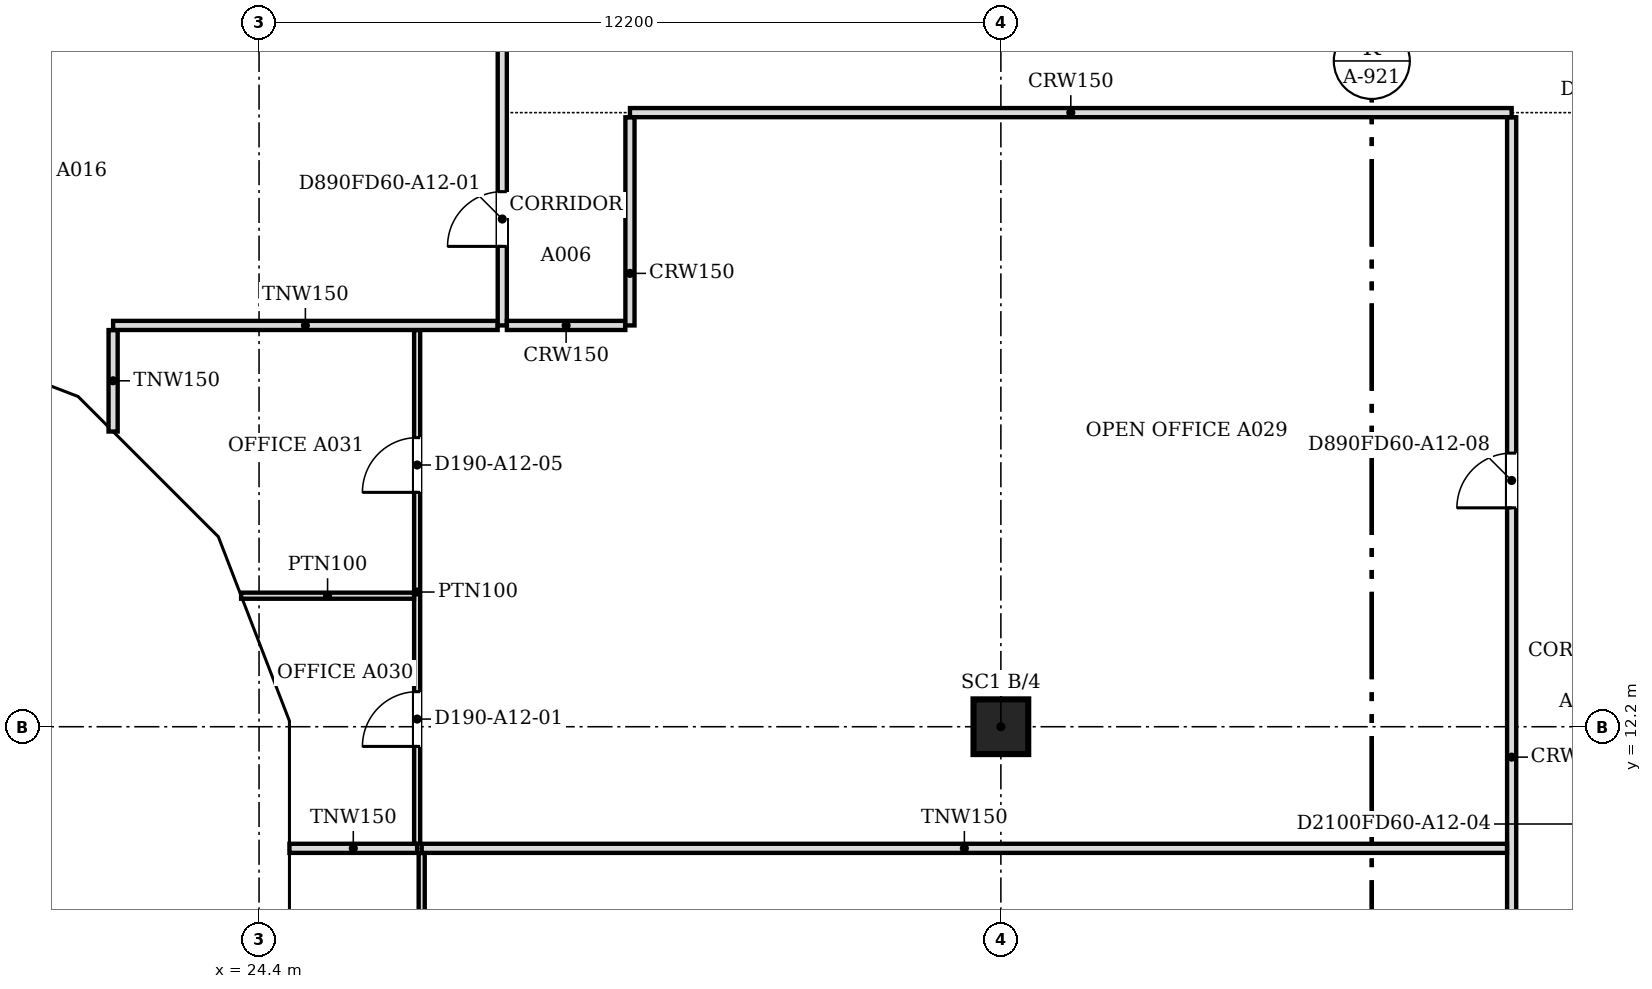
"""IFC4 building model, lengths in metres.
Left out: names, types, materials, properties, quantities, classifications, styles, units other than length and angle.
Written with IfcOpenShell. Run it as: python <this file> out.ifc"""

import sys

from ifc_helpers import new_model, si_unit, direction, frame, frame_2d, origin, origin_2d, place, context, subcontext, project, spatial, polyline, rectangle, outline, extrude, faceted_brep, source, transform, mapped, element, fill, save


model = new_model("IFC4")
c1 = context("Model", 3, precision=1e-05, world=origin(), true_north=direction((0.0, 1.0)))
c2 = subcontext(c1, "Body", "Model", "MODEL_VIEW")
j1 = project(units=[si_unit("LENGTHUNIT", "METRE"), si_unit("PLANEANGLEUNIT", "RADIAN")], contexts=[c1])
p1 = place(None, origin())
s1 = spatial("IfcSite", under=j1, at=p1, CompositionType="ELEMENT")
p2 = place(p1, origin())
s2 = spatial("IfcBuilding", under=s1, at=p2, CompositionType="ELEMENT")
p3 = place(p2, frame((0.0, 0.0, 139.2)))
s3 = spatial("IfcBuildingStorey", under=s2, at=p3, CompositionType="ELEMENT", Elevation=139.2)
p4 = place(p3, frame((36.6, 12.2, 0.0), z_axis=(0.0, 0.0, 1.0), x_axis=(1.0, 0.0, 0.0)))
e1 = element("IfcColumn", 1, at=p4, inside=s3, PredefinedType="COLUMN", context=c2, shape_type="SweptSolid", body=[
    extrude(rectangle(XDim=0.9, YDim=0.9, at=origin_2d()), origin(), (0.0, 0.0, 1.0), 3.6),
])
m1 = source(origin(), c2, "Body", "Brep", [
    faceted_brep([(3.096, -0.25, 7.536), (0.047, -0.25, 3.856), (0.047, -0.25, 3.744), (3.096, -0.25, 0.064), (0.0, 0.25, 3.8), (3.149, 0.25, 7.6), (3.202, 0.25, 7.536), (3.202, 0.25, 0.064), (3.149, 0.25, 0.0), (3.149, -0.0, 0.0), (3.149, -0.0, 7.6), (0.0, 0.0, 3.8)], [[[0, 1, 2, 3]], [[4, 5, 6, 7, 8]], [[8, 7, 9]], [[6, 5, 10]], [[5, 4, 11, 1, 0, 10]], [[4, 8, 9, 3, 2, 11]], [[11, 2, 1]], [[3, 9, 7, 6, 10, 0]]]),
])
p5 = place(p3, frame((18.346, 18.55, -3.8), z_axis=(0.0, 0.0, 1.0), x_axis=(0.932985567668, -0.359913782069, 0.0)))
e2 = element("IfcWall", 2, at=p5, inside=s3, PredefinedType="SOLIDWALL", context=c2, shape_type="MappedRepresentation", body=[
    mapped(m1, transform((0.0, 0.0, 0.0), scale=1.0)),
])
m2 = source(origin(), c2, "Body", "SweptSolid", [
    extrude(outline(polyline([(2.949, 6.967), (0.325, 3.8), (2.949, 0.633), (2.949, 6.967)])), frame((0.0, 0.26, 0.0), z_axis=(0.0, -1.0, 0.0), x_axis=(1.0, 0.0, 0.0)), (0.0, 0.0, 1.0), 0.52),
])
p6 = place(p5, origin())
e3 = element("IfcOpeningElement", 3, at=p6, cuts=e2, PredefinedType="OPENING", context=c2, shape_type="MappedRepresentation", body=[
    mapped(m2, transform((0.0, 0.0, 0.0), scale=1.0)),
])
m3 = source(origin(), c2, "Body", "Brep", [
    faceted_brep([(0.106, -0.25, 0.064), (3.156, -0.25, 3.736), (3.156, -0.25, 3.864), (0.106, -0.25, 7.536), (0.0, 0.25, 7.536), (0.053, 0.25, 7.6), (3.209, 0.25, 3.8), (0.053, 0.25, 0.0), (0.0, 0.25, 0.064), (3.209, -0.0, 3.8), (0.053, 0.0, 0.0), (0.053, 0.0, 7.6)], [[[0, 1, 2, 3]], [[4, 5, 6, 7, 8]], [[7, 6, 9, 1, 0, 10]], [[6, 5, 11, 3, 2, 9]], [[5, 4, 11]], [[8, 7, 10]], [[8, 10, 0, 3, 11, 4]], [[1, 9, 2]]]),
])
p7 = place(p3, frame((21.248, 17.454, -3.8), z_axis=(0.0, 0.0, 1.0), x_axis=(0.707106781187, -0.707106781187, 0.0)))
e4 = element("IfcWall", 4, at=p7, inside=s3, PredefinedType="SOLIDWALL", context=c2, shape_type="MappedRepresentation", body=[
    mapped(m3, transform((0.0, 0.0, 0.0), scale=1.0)),
])
m4 = source(origin(), c2, "Body", "SweptSolid", [
    extrude(outline(polyline([(0.253, 0.632), (2.884, 3.8), (0.253, 6.968), (0.253, 0.632)])), frame((0.0, 0.26, 0.0), z_axis=(0.0, -1.0, 0.0), x_axis=(1.0, 0.0, 0.0)), (0.0, 0.0, 1.0), 0.52),
])
p8 = place(p7, origin())
e5 = element("IfcOpeningElement", 5, at=p8, cuts=e4, PredefinedType="OPENING", context=c2, shape_type="MappedRepresentation", body=[
    mapped(m4, transform((0.0, 0.0, 0.0), scale=1.0)),
])
m5 = source(origin(), c2, "Body", "Brep", [
    faceted_brep([(3.103, -0.25, 7.544), (0.053, -0.25, 3.864), (0.053, -0.25, 3.736), (3.103, -0.25, 0.056), (0.0, 0.25, 3.8), (3.149, 0.25, 7.6), (3.196, 0.25, 7.543), (3.196, 0.25, 0.057), (3.149, 0.25, 0.0), (3.149, -0.0, 0.0), (3.149, -0.0, 7.6), (0.0, 0.0, 3.8)], [[[0, 1, 2, 3]], [[4, 5, 6, 7, 8]], [[8, 7, 9]], [[6, 5, 10]], [[5, 4, 11, 1, 0, 10]], [[4, 8, 9, 3, 2, 11]], [[11, 2, 1]], [[3, 9, 7, 6, 10, 0]]]),
])
p9 = place(p3, frame((23.517, 15.185, -3.8), z_axis=(0.0, 0.0, 1.0), x_axis=(0.359864468756, -0.933004589553, 0.0)))
e6 = element("IfcWall", 6, at=p9, inside=s3, PredefinedType="SOLIDWALL", context=c2, shape_type="MappedRepresentation", body=[
    mapped(m5, transform((0.0, 0.0, 0.0), scale=1.0)),
])
p10 = place(p9, origin())
e7 = element("IfcOpeningElement", 7, at=p10, cuts=e6, PredefinedType="OPENING", context=c2, shape_type="MappedRepresentation", body=[
    mapped(m2, transform((0.0, 0.0, 0.0), scale=1.0)),
])
m6 = source(origin(), c2, "Body", "Brep", [
    faceted_brep([(0.093, -0.25, 0.057), (3.143, -0.25, 3.8), (0.093, -0.25, 7.543), (0.0, 0.25, 7.544), (0.047, 0.25, 7.6), (3.143, 0.25, 3.8), (0.047, 0.25, 0.0), (0.0, 0.25, 0.056), (0.047, 0.0, 0.0), (0.047, 0.0, 7.6)], [[[0, 1, 2]], [[3, 4, 5, 6, 7]], [[6, 5, 1, 0, 8]], [[5, 4, 9, 2, 1]], [[4, 3, 9]], [[7, 6, 8]], [[7, 8, 0, 2, 9, 3]]]),
])
p11 = place(p3, frame((24.65, 12.293, -3.8), z_axis=(0.0, 0.0, 1.0), x_axis=(0.0, -1.0, 0.0)))
e8 = element("IfcWall", 8, at=p11, inside=s3, PredefinedType="SOLIDWALL", context=c2, shape_type="MappedRepresentation", body=[
    mapped(m6, transform((0.0, 0.0, 0.0), scale=1.0)),
])
m7 = source(origin(), c2, "Body", "SweptSolid", [
    extrude(outline(polyline([(0.247, 0.641), (2.821, 3.8), (0.247, 6.959), (0.247, 0.641)])), frame((0.0, 0.26, 0.0), z_axis=(0.0, -1.0, 0.0), x_axis=(1.0, 0.0, 0.0)), (0.0, 0.0, 1.0), 0.52),
])
p12 = place(p11, origin())
e9 = element("IfcOpeningElement", 9, at=p12, cuts=e8, PredefinedType="OPENING", context=c2, shape_type="MappedRepresentation", body=[
    mapped(m7, transform((0.0, 0.0, 0.0), scale=1.0)),
])
p13 = place(p2, frame((0.0, 0.0, 143.0)))
s4 = spatial("IfcBuildingStorey", under=s2, at=p13, CompositionType="ELEMENT", Elevation=143.0)
m8 = source(origin(), c2, "Body", "Brep", [
    faceted_brep([(0.093, -0.25, 0.056), (3.143, -0.25, 3.736), (3.143, -0.25, 3.864), (0.093, -0.25, 7.544), (0.0, 0.25, 7.543), (0.047, 0.25, 7.6), (3.196, 0.25, 3.8), (0.047, 0.25, 0.0), (0.0, 0.25, 0.057), (3.196, -0.0, 3.8), (0.047, 0.0, 0.0), (0.047, 0.0, 7.6)], [[[0, 1, 2, 3]], [[4, 5, 6, 7, 8]], [[7, 6, 9, 1, 0, 10]], [[6, 5, 11, 3, 2, 9]], [[5, 4, 11]], [[8, 7, 10]], [[8, 10, 0, 3, 11, 4]], [[1, 9, 2]]]),
])
p14 = place(p13, frame((18.303, 18.567, -3.8), z_axis=(0.0, 0.0, 1.0), x_axis=(0.932978940178, -0.359930961693, 0.0)))
e10 = element("IfcWall", 10, at=p14, inside=s4, PredefinedType="SOLIDWALL", context=c2, shape_type="MappedRepresentation", body=[
    mapped(m8, transform((0.0, 0.0, 0.0), scale=1.0)),
])
m9 = source(origin(), c2, "Body", "SweptSolid", [
    extrude(outline(polyline([(0.247, 0.633), (2.871, 3.8), (0.247, 6.967), (0.247, 0.633)])), frame((0.0, 0.26, 0.0), z_axis=(0.0, -1.0, 0.0), x_axis=(1.0, 0.0, 0.0)), (0.0, 0.0, 1.0), 0.52),
])
p15 = place(p14, origin())
e11 = element("IfcOpeningElement", 11, at=p15, cuts=e10, PredefinedType="OPENING", context=c2, shape_type="MappedRepresentation", body=[
    mapped(m9, transform((0.0, 0.0, 0.0), scale=1.0)),
])
m10 = source(origin(), c2, "Body", "Brep", [
    faceted_brep([(3.103, -0.25, 7.536), (0.053, -0.25, 3.864), (0.053, -0.25, 3.736), (3.103, -0.25, 0.064), (0.0, 0.25, 3.8), (3.156, 0.25, 7.6), (3.209, 0.25, 7.536), (3.209, 0.25, 0.064), (3.156, 0.25, 0.0), (3.156, -0.0, 0.0), (3.156, -0.0, 7.6), (0.0, 0.0, 3.8)], [[[0, 1, 2, 3]], [[4, 5, 6, 7, 8]], [[8, 7, 9]], [[6, 5, 10]], [[5, 4, 11, 1, 0, 10]], [[4, 8, 9, 3, 2, 11]], [[11, 2, 1]], [[3, 9, 7, 6, 10, 0]]]),
])
p16 = place(p13, frame((21.285, 17.417, -3.8), z_axis=(0.0, 0.0, 1.0), x_axis=(0.707106781187, -0.707106781187, 0.0)))
e12 = element("IfcWall", 12, at=p16, inside=s4, PredefinedType="SOLIDWALL", context=c2, shape_type="MappedRepresentation", body=[
    mapped(m10, transform((0.0, 0.0, 0.0), scale=1.0)),
])
m11 = source(origin(), c2, "Body", "SweptSolid", [
    extrude(outline(polyline([(2.956, 6.968), (0.325, 3.8), (2.956, 0.632), (2.956, 6.968)])), frame((0.0, 0.26, 0.0), z_axis=(0.0, -1.0, 0.0), x_axis=(1.0, 0.0, 0.0)), (0.0, 0.0, 1.0), 0.52),
])
p17 = place(p16, origin())
e13 = element("IfcOpeningElement", 13, at=p17, cuts=e12, PredefinedType="OPENING", context=c2, shape_type="MappedRepresentation", body=[
    mapped(m11, transform((0.0, 0.0, 0.0), scale=1.0)),
])
m12 = source(origin(), c2, "Body", "Brep", [
    faceted_brep([(0.106, -0.25, 0.064), (3.156, -0.25, 3.744), (3.156, -0.25, 3.856), (0.106, -0.25, 7.536), (0.0, 0.25, 7.536), (0.053, 0.25, 7.6), (3.202, 0.25, 3.8), (0.053, 0.25, 0.0), (0.0, 0.25, 0.064), (3.202, -0.0, 3.8), (0.053, 0.0, 0.0), (0.053, 0.0, 7.6)], [[[0, 1, 2, 3]], [[4, 5, 6, 7, 8]], [[7, 6, 9, 1, 0, 10]], [[6, 5, 11, 3, 2, 9]], [[5, 4, 11]], [[8, 7, 10]], [[8, 10, 0, 3, 11, 4]], [[1, 9, 2]]]),
])
p18 = place(p13, frame((23.497, 15.234, -3.8), z_axis=(0.0, 0.0, 1.0), x_axis=(0.359913782069, -0.932985567668, 0.0)))
e14 = element("IfcWall", 14, at=p18, inside=s4, PredefinedType="SOLIDWALL", context=c2, shape_type="MappedRepresentation", body=[
    mapped(m12, transform((0.0, 0.0, 0.0), scale=1.0)),
])
m13 = source(origin(), c2, "Body", "SweptSolid", [
    extrude(outline(polyline([(0.253, 0.633), (2.878, 3.8), (0.253, 6.967), (0.253, 0.633)])), frame((0.0, 0.26, 0.0), z_axis=(0.0, -1.0, 0.0), x_axis=(1.0, 0.0, 0.0)), (0.0, 0.0, 1.0), 0.52),
])
p19 = place(p18, origin())
e15 = element("IfcOpeningElement", 15, at=p19, cuts=e14, PredefinedType="OPENING", context=c2, shape_type="MappedRepresentation", body=[
    mapped(m13, transform((0.0, 0.0, 0.0), scale=1.0)),
])
m14 = source(origin(), c2, "Body", "Brep", [
    faceted_brep([(3.096, -0.25, 0.0), (6.1, -0.25, 3.8), (3.096, -0.25, 7.6), (0.047, -0.25, 3.857), (0.047, -0.25, 3.743), (0.0, 0.25, 3.8), (3.096, 0.25, 7.6), (6.053, 0.25, 3.859), (6.053, 0.25, 3.741), (3.096, 0.25, 0.0), (6.1, -0.0, 3.8), (0.0, 0.0, 3.8)], [[[0, 1, 2, 3, 4]], [[5, 6, 7, 8, 9]], [[9, 8, 10, 1, 0]], [[7, 6, 2, 1, 10]], [[6, 5, 11, 3, 2]], [[5, 9, 0, 4, 11]], [[11, 4, 3]], [[10, 8, 7]]]),
])
p20 = place(p13, frame((24.65, 12.247, -3.8), z_axis=(0.0, 0.0, 1.0), x_axis=(0.0, -1.0, 0.0)))
e16 = element("IfcWall", 16, at=p20, inside=s4, PredefinedType="SOLIDWALL", context=c2, shape_type="MappedRepresentation", body=[
    mapped(m14, transform((0.0, 0.0, 0.0), scale=1.0)),
])
m15 = source(origin(), c2, "Body", "SweptSolid", [
    extrude(outline(polyline([(3.094, 0.399), (5.781, 3.8), (3.094, 7.201), (0.323, 3.8), (3.094, 0.399)])), frame((0.0, 0.26, 0.0), z_axis=(0.0, -1.0, 0.0), x_axis=(1.0, 0.0, 0.0)), (0.0, 0.0, 1.0), 0.52),
])
p21 = place(p20, origin())
e17 = element("IfcOpeningElement", 17, at=p21, cuts=e16, PredefinedType="OPENING", context=c2, shape_type="MappedRepresentation", body=[
    mapped(m15, transform((0.0, 0.0, 0.0), scale=1.0)),
])
p22 = place(p3, frame((45.0, 0.5, 0.0), z_axis=(0.0, 0.0, 1.0), x_axis=(0.0, 1.0, 0.0)))
e18 = element("IfcWall", 18, at=p22, inside=s3, PredefinedType="PARTITIONING", context=c2, shape_type="SweptSolid", body=[
    extrude(rectangle(XDim=21.724, YDim=0.15, at=frame_2d((10.862, 0.0))), origin(), (0.0, 0.0, 1.0), 3.067),
])
m16 = source(origin(), c2, "Body", "SweptSolid", [
    extrude(rectangle(XDim=0.9, YDim=2.1, at=frame_2d((0.45, 1.05))), frame((0.0, 0.085, 0.0), z_axis=(0.0, -1.0, 0.0), x_axis=(1.0, 0.0, 0.0)), (0.0, 0.0, 1.0), 0.17),
])
p23 = place(p22, frame((6.2, 0.0, 0.0)))
e19 = element("IfcOpeningElement", 19, at=p23, cuts=e18, PredefinedType="OPENING", context=c2, shape_type="MappedRepresentation", body=[
    mapped(m16, transform((0.0, 0.0, 0.0), scale=1.0)),
])
p24 = place(p22, frame((15.3, 0.0, 0.0)))
e20 = element("IfcOpeningElement", 20, at=p24, cuts=e18, PredefinedType="OPENING", context=c2, shape_type="MappedRepresentation", body=[
    mapped(m16, transform((0.0, 0.0, 0.0), scale=1.0)),
])
p25 = place(p3, frame((27.075, 4.2, 0.0), z_axis=(0.0, 0.0, 1.0), x_axis=(0.0, 1.0, 0.0)))
e21 = element("IfcWall", 21, at=p25, inside=s3, PredefinedType="PARTITIONING", context=c2, shape_type="SweptSolid", body=[
    extrude(rectangle(XDim=5.924, YDim=0.1, at=frame_2d((2.962, 0.0))), origin(), (0.0, 0.0, 1.0), 3.067),
])
m17 = source(origin(), c2, "Body", "SweptSolid", [
    extrude(rectangle(XDim=0.9, YDim=2.1, at=frame_2d((0.45, 1.05))), frame((0.0, 0.06, 0.0), z_axis=(0.0, -1.0, 0.0), x_axis=(1.0, 0.0, 0.0)), (0.0, 0.0, 1.0), 0.12),
])
p26 = place(p25, frame((2.5, 0.0, 0.0)))
e22 = element("IfcOpeningElement", 22, at=p26, cuts=e21, PredefinedType="OPENING", context=c2, shape_type="MappedRepresentation", body=[
    mapped(m17, transform((0.0, 0.0, 0.0), scale=1.0)),
])
p27 = place(p3, frame((24.9, 10.2, 0.0), z_axis=(0.0, 0.0, 1.0), x_axis=(1.0, 0.0, 0.0)))
e23 = element("IfcWall", 23, at=p27, inside=s3, PredefinedType="PARTITIONING", context=c2, shape_type="SweptSolid", body=[
    extrude(rectangle(XDim=2.1, YDim=0.15, at=frame_2d((1.05, 0.0))), origin(), (0.0, 0.0, 1.0), 3.067),
])
p28 = place(p3, frame((27.075, 10.2, 0.0), z_axis=(0.0, 0.0, 1.0), x_axis=(1.0, 0.0, 0.0)))
e24 = element("IfcWall", 24, at=p28, inside=s3, PredefinedType="PARTITIONING", context=c2, shape_type="SweptSolid", body=[
    extrude(rectangle(XDim=17.849, YDim=0.15, at=frame_2d((8.925, 0.0))), origin(), (0.0, 0.0, 1.0), 3.067),
])
p29 = place(p3, frame((27.0, 10.276, 0.0), z_axis=(0.0, 0.0, 1.0), x_axis=(0.0, 1.0, 0.0)))
e25 = element("IfcWall", 25, at=p29, inside=s3, PredefinedType="PARTITIONING", context=c2, shape_type="SweptSolid", body=[
    extrude(rectangle(XDim=8.448, YDim=0.1, at=frame_2d((4.224, 0.0))), origin(), (0.0, 0.0, 1.0), 3.067),
])
p30 = place(p29, frame((1.6, 0.0, 0.0)))
e26 = element("IfcOpeningElement", 26, at=p30, cuts=e25, PredefinedType="OPENING", context=c2, shape_type="MappedRepresentation", body=[
    mapped(m17, transform((0.0, 0.0, 0.0), scale=1.0)),
])
p31 = place(p29, frame((5.779, 0.0, 0.0)))
e27 = element("IfcOpeningElement", 27, at=p31, cuts=e25, PredefinedType="OPENING", context=c2, shape_type="MappedRepresentation", body=[
    mapped(m17, transform((0.0, 0.0, 0.0), scale=1.0)),
])
p32 = place(p3, frame((24.105, 14.355, 0.0), z_axis=(0.0, 0.0, 1.0), x_axis=(1.0, 0.0, 0.0)))
e28 = element("IfcWall", 28, at=p32, inside=s3, PredefinedType="PARTITIONING", context=c2, shape_type="SweptSolid", body=[
    extrude(rectangle(XDim=2.844, YDim=0.1, at=frame_2d((1.422, 0.0))), origin(), (0.0, 0.0, 1.0), 3.067),
])
p33 = place(p3, frame((22.0, 17.055, 0.0), z_axis=(0.0, 0.0, 1.0), x_axis=(0.0, 1.0, 0.0)))
e29 = element("IfcWall", 29, at=p33, inside=s3, PredefinedType="PARTITIONING", context=c2, shape_type="SweptSolid", body=[
    extrude(rectangle(XDim=1.669, YDim=0.15, at=frame_2d((0.834, 0.0))), origin(), (0.0, 0.0, 1.0), 3.067),
])
p34 = place(p3, frame((22.0, 18.8, 0.0), z_axis=(0.0, 0.0, 1.0), x_axis=(1.0, 0.0, 0.0)))
e30 = element("IfcWall", 30, at=p34, inside=s3, PredefinedType="PARTITIONING", context=c2, shape_type="SweptSolid", body=[
    extrude(rectangle(XDim=6.324, YDim=0.15, at=frame_2d((3.162, 0.0))), origin(), (0.0, 0.0, 1.0), 3.067),
])
p35 = place(p3, frame((28.4, 18.8, 0.0), z_axis=(0.0, 0.0, 1.0), x_axis=(0.0, 1.0, 0.0)))
e31 = element("IfcWall", 31, at=p35, inside=s3, PredefinedType="PARTITIONING", context=c2, shape_type="SweptSolid", body=[
    extrude(rectangle(XDim=26.824, YDim=0.15, at=frame_2d((13.412, 0.0))), origin(), (0.0, 0.0, 1.0), 3.067),
])
p36 = place(p35, frame((1.3, 0.0, 0.0)))
e32 = element("IfcOpeningElement", 32, at=p36, cuts=e31, PredefinedType="OPENING", context=c2, shape_type="MappedRepresentation", body=[
    mapped(m16, transform((0.0, 0.0, 0.0), scale=1.0)),
])
p37 = place(p35, frame((23.351, 0.0, 0.0)))
e33 = element("IfcOpeningElement", 33, at=p37, cuts=e31, PredefinedType="OPENING", context=c2, shape_type="MappedRepresentation", body=[
    mapped(m16, transform((0.0, 0.0, 0.0), scale=1.0)),
])
p38 = place(p35, frame((17.351, 0.0, 0.0)))
e34 = element("IfcOpeningElement", 34, at=p38, cuts=e31, PredefinedType="OPENING", context=c2, shape_type="MappedRepresentation", body=[
    mapped(m16, transform((0.0, 0.0, 0.0), scale=1.0)),
])
p39 = place(p35, frame((9.7, 0.0, 0.0)))
e35 = element("IfcOpeningElement", 35, at=p39, cuts=e31, PredefinedType="OPENING", context=c2, shape_type="MappedRepresentation", body=[
    mapped(m16, transform((0.0, 0.0, 0.0), scale=1.0)),
])
p40 = place(p3, frame((28.476, 18.8, 0.0), z_axis=(0.0, 0.0, 1.0), x_axis=(1.0, 0.0, 0.0)))
e36 = element("IfcWall", 36, at=p40, inside=s3, PredefinedType="PARTITIONING", context=c2, shape_type="SweptSolid", body=[
    extrude(rectangle(XDim=1.948, YDim=0.15, at=frame_2d((0.974, 0.0))), origin(), (0.0, 0.0, 1.0), 3.067),
])
p41 = place(p3, frame((30.5, 18.8, 0.0), z_axis=(0.0, 0.0, 1.0), x_axis=(0.0, 1.0, 0.0)))
e37 = element("IfcWall", 37, at=p41, inside=s3, PredefinedType="PARTITIONING", context=c2, shape_type="SweptSolid", body=[
    extrude(rectangle(XDim=3.424, YDim=0.15, at=frame_2d((1.712, 0.0))), origin(), (0.0, 0.0, 1.0), 3.067),
])
p42 = place(p3, frame((30.5, 22.3, 0.0), z_axis=(0.0, 0.0, 1.0), x_axis=(1.0, 0.0, 0.0)))
e38 = element("IfcWall", 38, at=p42, inside=s3, PredefinedType="PARTITIONING", context=c2, shape_type="SweptSolid", body=[
    extrude(rectangle(XDim=14.5, YDim=0.15, at=frame_2d((7.25, 0.0))), origin(), (0.0, 0.0, 1.0), 3.067),
])
m18 = source(origin(), c2, "Body", "SweptSolid", [
    extrude(rectangle(XDim=0.9, YDim=2.1, at=frame_2d((0.45, 1.05))), frame((0.0, 0.025, 0.0), z_axis=(0.0, -1.0, 0.0), x_axis=(1.0, 0.0, 0.0)), (0.0, 0.0, 1.0), 0.05),
])
p43 = place(p36, origin())
e39 = element("IfcDoor", 39, at=p43, inside=s3, OperationType="SINGLE_SWING_LEFT", PredefinedType="DOOR", context=c2, shape_type="MappedRepresentation", body=[
    mapped(m18, transform((0.0, 0.0, 0.0), scale=1.0)),
])
fill(e32, e39)
p44 = place(p30, origin())
e40 = element("IfcDoor", 40, at=p44, inside=s3, OperationType="SINGLE_SWING_LEFT", PredefinedType="DOOR", context=c2, shape_type="MappedRepresentation", body=[
    mapped(m18, transform((0.0, 0.0, 0.0), scale=1.0)),
])
fill(e26, e40)
p45 = place(p31, origin())
e41 = element("IfcDoor", 41, at=p45, inside=s3, OperationType="SINGLE_SWING_LEFT", PredefinedType="DOOR", context=c2, shape_type="MappedRepresentation", body=[
    mapped(m18, transform((0.0, 0.0, 0.0), scale=1.0)),
])
fill(e27, e41)
p46 = place(p24, origin())
e42 = element("IfcDoor", 42, at=p46, inside=s3, OperationType="SINGLE_SWING_LEFT", PredefinedType="DOOR", context=c2, shape_type="MappedRepresentation", body=[
    mapped(m18, transform((0.0, 0.0, 0.0), scale=1.0)),
])
fill(e20, e42)
save(model, sys.argv[1])
